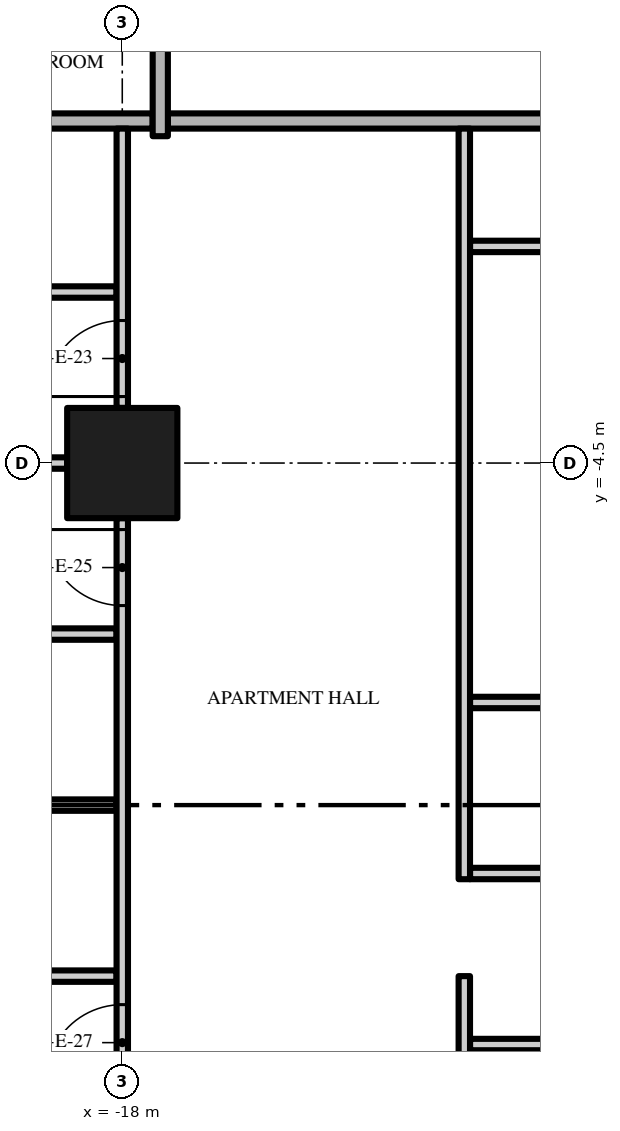
"""IFC4 building model, lengths in metres.
Left out: names, types, materials, properties, quantities, classifications, styles, units other than length and angle.
Written with IfcOpenShell. Run it as: python <this file> out.ifc"""

import sys

from ifc_helpers import new_model, si_unit, direction, frame, frame_2d, origin, origin_2d, place, context, subcontext, project, spatial, rectangle, extrude, element, fill, save


model = new_model("IFC4")
c1 = context("Model", 3, precision=1e-05, world=origin(), true_north=direction((0.0, 1.0)))
c2 = subcontext(c1, "Body", "Model", "MODEL_VIEW")
j1 = project(units=[si_unit("LENGTHUNIT", "METRE"), si_unit("PLANEANGLEUNIT", "RADIAN")], contexts=[c1])
p1 = place(None, origin())
s1 = spatial("IfcSite", under=j1, at=p1, CompositionType="ELEMENT")
p2 = place(p1, origin())
s2 = spatial("IfcBuilding", under=s1, at=p2, CompositionType="ELEMENT")
p3 = place(p2, frame((0.0, 0.0, 60.6)))
s3 = spatial("IfcBuildingStorey", under=s2, at=p3, CompositionType="ELEMENT", Elevation=60.6)
p4 = place(p3, frame((-18.0, -4.5, 0.0), z_axis=(0.0, 0.0, 1.0), x_axis=(1.0, 0.0, 0.0)))
e1 = element("IfcColumn", 1, at=p4, inside=s3, PredefinedType="COLUMN", context=c2, shape_type="SweptSolid", body=[
    extrude(rectangle(XDim=1.45, YDim=1.45, at=origin_2d()), origin(), (0.0, 0.0, 1.0), 3.5),
])
p5 = place(p3, frame((-13.425, -12.15, 0.0), z_axis=(0.0, 0.0, 1.0), x_axis=(1.0, 0.0, 0.0)))
e2 = element("IfcWall", 2, at=p5, inside=s3, PredefinedType="PARTITIONING", context=c2, shape_type="SweptSolid", body=[
    extrude(rectangle(XDim=4.35, YDim=0.15, at=frame_2d((2.175, 0.0))), origin(), (0.0, 0.0, 1.0), 3.5),
])
p6 = place(p3, frame((-20.925, -11.25, 0.0), z_axis=(0.0, 0.0, 1.0), x_axis=(1.0, 0.0, 0.0)))
e3 = element("IfcWall", 3, at=p6, inside=s3, PredefinedType="PARTITIONING", context=c2, shape_type="SweptSolid", body=[
    extrude(rectangle(XDim=2.85, YDim=0.15, at=frame_2d((1.425, 0.0))), origin(), (0.0, 0.0, 1.0), 3.5),
])
p7 = place(p3, frame((-13.425, -9.9, 0.0), z_axis=(0.0, 0.0, 1.0), x_axis=(1.0, 0.0, 0.0)))
e4 = element("IfcWall", 4, at=p7, inside=s3, PredefinedType="PARTITIONING", context=c2, shape_type="SweptSolid", body=[
    extrude(rectangle(XDim=4.35, YDim=0.15, at=frame_2d((2.175, 0.0))), origin(), (0.0, 0.0, 1.0), 3.5),
])
p8 = place(p7, frame((1.75, 0.0, 0.0)))
e5 = element("IfcOpeningElement", 5, at=p8, cuts=e4, PredefinedType="OPENING", context=c2, shape_type="SweptSolid", body=[
    extrude(rectangle(XDim=0.9, YDim=2.1, at=frame_2d((0.45, 1.05))), frame((0.0, 0.085, 0.0), z_axis=(0.0, -1.0, 0.0), x_axis=(1.0, 0.0, 0.0)), (0.0, 0.0, 1.0), 0.17),
])
p9 = place(p3, frame((-20.925, -9.0, 0.0), z_axis=(0.0, 0.0, 1.0), x_axis=(1.0, 0.0, 0.0)))
e6 = element("IfcWall", 6, at=p9, inside=s3, PredefinedType="PARTITIONING", context=c2, shape_type="SweptSolid", body=[
    extrude(rectangle(XDim=2.85, YDim=0.15, at=frame_2d((1.425, 0.0))), origin(), (0.0, 0.0, 1.0), 3.5),
])
p10 = place(p3, frame((-13.425, -7.65, 0.0), z_axis=(0.0, 0.0, 1.0), x_axis=(1.0, 0.0, 0.0)))
e7 = element("IfcWall", 7, at=p10, inside=s3, PredefinedType="PARTITIONING", context=c2, shape_type="SweptSolid", body=[
    extrude(rectangle(XDim=4.35, YDim=0.15, at=frame_2d((2.175, 0.0))), origin(), (0.0, 0.0, 1.0), 3.5),
])
p11 = place(p3, frame((-20.925, -6.75, 0.0), z_axis=(0.0, 0.0, 1.0), x_axis=(1.0, 0.0, 0.0)))
e8 = element("IfcWall", 8, at=p11, inside=s3, PredefinedType="PARTITIONING", context=c2, shape_type="SweptSolid", body=[
    extrude(rectangle(XDim=2.85, YDim=0.15, at=frame_2d((1.425, 0.0))), origin(), (0.0, 0.0, 1.0), 3.5),
])
p12 = place(p3, frame((-25.65, -4.5, 0.0), z_axis=(0.0, 0.0, 1.0), x_axis=(1.0, 0.0, 0.0)))
e9 = element("IfcWall", 9, at=p12, inside=s3, PredefinedType="PARTITIONING", context=c2, shape_type="SweptSolid", body=[
    extrude(rectangle(XDim=6.925, YDim=0.15, at=frame_2d((3.462, 0.0))), origin(), (0.0, 0.0, 1.0), 3.5),
])
p13 = place(p3, frame((-20.925, -2.25, 0.0), z_axis=(0.0, 0.0, 1.0), x_axis=(1.0, 0.0, 0.0)))
e10 = element("IfcWall", 10, at=p13, inside=s3, PredefinedType="PARTITIONING", context=c2, shape_type="SweptSolid", body=[
    extrude(rectangle(XDim=2.85, YDim=0.15, at=frame_2d((1.425, 0.0))), origin(), (0.0, 0.0, 1.0), 3.5),
])
p14 = place(p3, frame((-13.425, -1.65, 0.0), z_axis=(0.0, 0.0, 1.0), x_axis=(1.0, 0.0, 0.0)))
e11 = element("IfcWall", 11, at=p14, inside=s3, PredefinedType="PARTITIONING", context=c2, shape_type="SweptSolid", body=[
    extrude(rectangle(XDim=4.35, YDim=0.15, at=frame_2d((2.175, 0.0))), origin(), (0.0, 0.0, 1.0), 3.5),
])
p15 = place(p3, frame((-17.4, 0.0, 0.0), z_axis=(0.0, 0.0, 1.0), x_axis=(1.0, 0.0, 0.0)))
e12 = element("IfcWall", 12, at=p15, inside=s3, PredefinedType="PARTITIONING", context=c2, shape_type="SweptSolid", body=[
    extrude(rectangle(XDim=12.8, YDim=0.2, at=frame_2d((6.4, 0.0))), origin(), (0.0, 0.0, 1.0), 3.5),
])
p16 = place(p3, frame((-26.7, 0.0, 0.0), z_axis=(0.0, 0.0, 1.0), x_axis=(1.0, 0.0, 0.0)))
e13 = element("IfcWall", 13, at=p16, inside=s3, PredefinedType="PARTITIONING", context=c2, shape_type="SweptSolid", body=[
    extrude(rectangle(XDim=9.1, YDim=0.2, at=frame_2d((4.55, 0.0))), origin(), (0.0, 0.0, 1.0), 3.5),
])
p17 = place(p3, frame((-18.0, -12.775, 0.0), z_axis=(0.0, 0.0, 1.0), x_axis=(0.0, 1.0, 0.0)))
e14 = element("IfcWall", 14, at=p17, inside=s3, PredefinedType="PARTITIONING", context=c2, shape_type="SweptSolid", body=[
    extrude(rectangle(XDim=7.55, YDim=0.15, at=frame_2d((3.775, 0.0))), origin(), (0.0, 0.0, 1.0), 3.5),
])
p18 = place(p17, frame((6.4, 0.0, 0.0)))
e15 = element("IfcOpeningElement", 15, at=p18, cuts=e14, PredefinedType="OPENING", context=c2, shape_type="SweptSolid", body=[
    extrude(rectangle(XDim=1.0, YDim=2.4, at=frame_2d((0.5, 1.2))), frame((0.0, 0.085, 0.0), z_axis=(0.0, -1.0, 0.0), x_axis=(1.0, 0.0, 0.0)), (0.0, 0.0, 1.0), 0.17),
])
p19 = place(p17, frame((0.15, 0.0, 0.0)))
e16 = element("IfcOpeningElement", 16, at=p19, cuts=e14, PredefinedType="OPENING", context=c2, shape_type="SweptSolid", body=[
    extrude(rectangle(XDim=1.0, YDim=2.4, at=frame_2d((0.5, 1.2))), frame((0.0, 0.085, 0.0), z_axis=(0.0, -1.0, 0.0), x_axis=(1.0, 0.0, 0.0)), (0.0, 0.0, 1.0), 0.17),
])
p20 = place(p3, frame((-18.0, -3.775, 0.0), z_axis=(0.0, 0.0, 1.0), x_axis=(0.0, 1.0, 0.0)))
e17 = element("IfcWall", 17, at=p20, inside=s3, PredefinedType="PARTITIONING", context=c2, shape_type="SweptSolid", body=[
    extrude(rectangle(XDim=3.675, YDim=0.15, at=frame_2d((1.837, 0.0))), origin(), (0.0, 0.0, 1.0), 3.5),
])
p21 = place(p20, frame((0.15, 0.0, 0.0)))
e18 = element("IfcOpeningElement", 18, at=p21, cuts=e17, PredefinedType="OPENING", context=c2, shape_type="SweptSolid", body=[
    extrude(rectangle(XDim=1.0, YDim=2.4, at=frame_2d((0.5, 1.2))), frame((0.0, 0.085, 0.0), z_axis=(0.0, -1.0, 0.0), x_axis=(1.0, 0.0, 0.0)), (0.0, 0.0, 1.0), 0.17),
])
p22 = place(p3, frame((-17.5, -0.2, 0.0), z_axis=(0.0, 0.0, 1.0), x_axis=(0.0, 1.0, 0.0)))
e19 = element("IfcWall", 19, at=p22, inside=s3, PredefinedType="PARTITIONING", context=c2, shape_type="SweptSolid", body=[
    extrude(rectangle(XDim=3.975, YDim=0.2, at=frame_2d((1.988, 0.0))), origin(), (0.0, 0.0, 1.0), 3.5),
])
p23 = place(p3, frame((-13.5, -11.25, 0.0), z_axis=(0.0, 0.0, 1.0), x_axis=(0.0, -1.0, 0.0)))
e20 = element("IfcWall", 20, at=p23, inside=s3, PredefinedType="PARTITIONING", context=c2, shape_type="SweptSolid", body=[
    extrude(rectangle(XDim=10.95, YDim=0.15, at=frame_2d((5.475, 0.0))), origin(), (0.0, 0.0, 1.0), 3.5),
])
p24 = place(p23, frame((1.8, 0.0, 0.0)))
e21 = element("IfcOpeningElement", 21, at=p24, cuts=e20, PredefinedType="OPENING", context=c2, shape_type="SweptSolid", body=[
    extrude(rectangle(XDim=0.8, YDim=2.0, at=frame_2d((0.4, 1.0))), frame((0.0, 0.085, 0.0), z_axis=(0.0, -1.0, 0.0), x_axis=(1.0, 0.0, 0.0)), (0.0, 0.0, 1.0), 0.17),
])
p25 = place(p23, frame((9.95, 0.0, 0.0)))
e22 = element("IfcOpeningElement", 22, at=p25, cuts=e20, PredefinedType="OPENING", context=c2, shape_type="SweptSolid", body=[
    extrude(rectangle(XDim=0.8, YDim=2.0, at=frame_2d((0.4, 1.0))), frame((0.0, 0.085, 0.0), z_axis=(0.0, -1.0, 0.0), x_axis=(1.0, 0.0, 0.0)), (0.0, 0.0, 1.0), 0.17),
])
p26 = place(p3, frame((-13.5, -9.975, 0.0), z_axis=(0.0, 0.0, 1.0), x_axis=(0.0, 1.0, 0.0)))
e23 = element("IfcWall", 23, at=p26, inside=s3, PredefinedType="PARTITIONING", context=c2, shape_type="SweptSolid", body=[
    extrude(rectangle(XDim=9.875, YDim=0.15, at=frame_2d((4.938, 0.0))), origin(), (0.0, 0.0, 1.0), 3.5),
])
p27 = place(p21, origin())
e24 = element("IfcDoor", 24, at=p27, inside=s3, OperationType="SINGLE_SWING_LEFT", PredefinedType="DOOR", context=c2, shape_type="SweptSolid", body=[
    extrude(rectangle(XDim=1.0, YDim=2.4, at=frame_2d((0.5, 1.2))), frame((0.0, 0.025, 0.0), z_axis=(0.0, -1.0, 0.0), x_axis=(1.0, 0.0, 0.0)), (0.0, 0.0, 1.0), 0.05),
])
fill(e18, e24)
p28 = place(p18, origin())
e25 = element("IfcDoor", 25, at=p28, inside=s3, OperationType="SINGLE_SWING_RIGHT", PredefinedType="DOOR", context=c2, shape_type="SweptSolid", body=[
    extrude(rectangle(XDim=1.0, YDim=2.4, at=frame_2d((0.5, 1.2))), frame((0.0, 0.025, 0.0), z_axis=(0.0, -1.0, 0.0), x_axis=(1.0, 0.0, 0.0)), (0.0, 0.0, 1.0), 0.05),
])
fill(e15, e25)
p29 = place(p19, origin())
e26 = element("IfcDoor", 26, at=p29, inside=s3, OperationType="SINGLE_SWING_LEFT", PredefinedType="DOOR", context=c2, shape_type="SweptSolid", body=[
    extrude(rectangle(XDim=1.0, YDim=2.4, at=frame_2d((0.5, 1.2))), frame((0.0, 0.025, 0.0), z_axis=(0.0, -1.0, 0.0), x_axis=(1.0, 0.0, 0.0)), (0.0, 0.0, 1.0), 0.05),
])
fill(e16, e26)
save(model, sys.argv[1])
